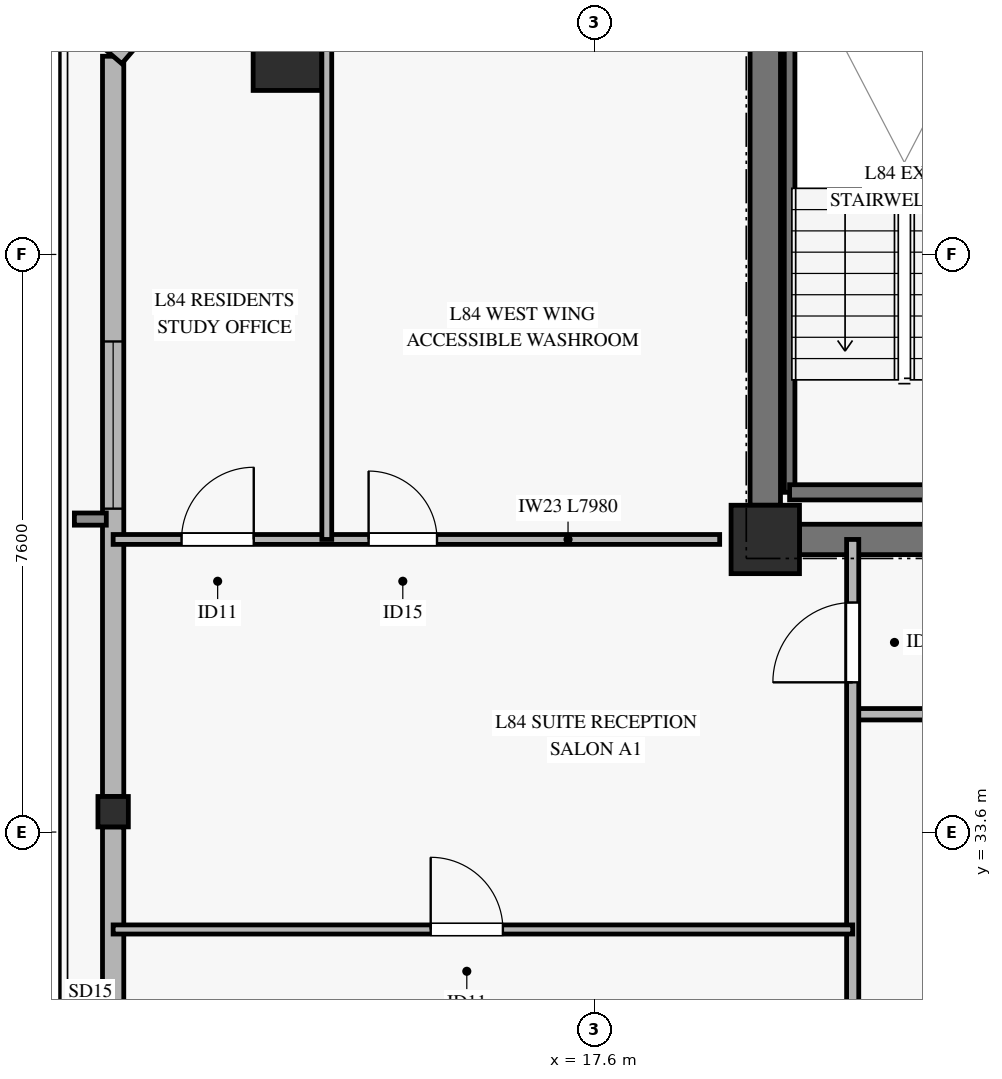
"""IFC4 building model, lengths in metres.
Left out: names, types, materials, properties, quantities, classifications, styles, units other than length and angle.
Written with IfcOpenShell. Run it as: python <this file> out.ifc"""

import sys

from ifc_helpers import new_model, si_unit, direction, frame, frame_2d, origin, origin_2d, place, context, subcontext, project, spatial, rectangle, hollow_rectangle, extrude, source, transform, mapped, element, fill, save


model = new_model("IFC4")
c1 = context("Model", 3, precision=1e-05, world=origin(), true_north=direction((0.0, 1.0)))
c2 = subcontext(c1, "Body", "Model", "MODEL_VIEW")
j1 = project(units=[si_unit("LENGTHUNIT", "METRE"), si_unit("PLANEANGLEUNIT", "RADIAN")], contexts=[c1])
p1 = place(None, origin())
s1 = spatial("IfcSite", under=j1, at=p1, CompositionType="ELEMENT")
p2 = place(p1, origin())
s2 = spatial("IfcBuilding", under=s1, at=p2, CompositionType="ELEMENT")
p3 = place(p2, frame((0.0, 0.0, 324.4)))
s3 = spatial("IfcBuildingStorey", under=s2, at=p3, CompositionType="ELEMENT", Elevation=324.4)
m1 = source(origin(), c2, "Body", "SweptSolid", [
    extrude(rectangle(XDim=0.9, YDim=0.9, at=origin_2d()), origin(), (0.0, 0.0, 1.0), 3.12),
])
p4 = place(p3, frame((19.85, 37.45, 0.0), z_axis=(0.0, 0.0, 1.0), x_axis=(1.0, 0.0, 0.0)))
e1 = element("IfcColumn", 1, at=p4, inside=s3, PredefinedType="PILASTER", context=c2, shape_type="MappedRepresentation", body=[
    mapped(m1, transform((0.0, 0.0, 0.0), x_axis=(1.0, 0.0, 0.0), y_axis=(0.0, 1.0, 0.0), z_axis=(0.0, 0.0, 1.0), scale=1.0)),
])
p5 = place(p3, frame((20.3, 37.45, 0.0), z_axis=(0.0, 0.0, 1.0), x_axis=(1.0, 0.0, 0.0)))
e2 = element("IfcWall", 2, at=p5, inside=s3, PredefinedType="SHEAR", context=c2, shape_type="SweptSolid", body=[
    extrude(rectangle(XDim=10.05, YDim=0.4, at=frame_2d((5.025, 0.0))), origin(), (0.0, 0.0, 1.0), 3.12),
])
p6 = place(p5, frame((4.25, 0.0, 0.0)))
e3 = element("IfcOpeningElement", 3, at=p6, cuts=e2, PredefinedType="OPENING", context=c2, shape_type="SweptSolid", body=[
    extrude(rectangle(XDim=1.2, YDim=2.15, at=frame_2d((0.6, 1.075))), frame((0.0, 0.21, 0.0), z_axis=(0.0, -1.0, 0.0), x_axis=(1.0, 0.0, 0.0)), (0.0, 0.0, 1.0), 0.42),
])
p7 = place(p3, frame((19.85, 37.9, 0.0), z_axis=(0.0, 0.0, 1.0), x_axis=(0.0, 1.0, 0.0)))
e4 = element("IfcWall", 4, at=p7, inside=s3, PredefinedType="SHEAR", context=c2, shape_type="SweptSolid", body=[
    extrude(rectangle(XDim=8.2, YDim=0.4, at=frame_2d((4.1, 0.0))), origin(), (0.0, 0.0, 1.0), 3.12),
])
m2 = source(origin(), c2, "Body", "SweptSolid", [
    extrude(hollow_rectangle(XDim=0.9, YDim=0.9, WallThickness=0.04, at=origin_2d()), origin(), (0.0, 0.0, 1.0), 3.12),
])
p8 = place(p3, frame((13.562, 43.808, 0.0), z_axis=(0.0, 0.0, 1.0), x_axis=(1.0, 0.0, 0.0)))
e5 = element("IfcColumn", 5, at=p8, inside=s3, PredefinedType="COLUMN", context=c2, shape_type="MappedRepresentation", body=[
    mapped(m2, transform((0.0, 0.0, 0.0), x_axis=(1.0, 0.0, 0.0), y_axis=(0.0, 1.0, 0.0), z_axis=(0.0, 0.0, 1.0), scale=1.0)),
])
m3 = source(origin(), c2, "Body", "SweptSolid", [
    extrude(hollow_rectangle(XDim=0.4, YDim=0.4, WallThickness=0.02, at=origin_2d()), origin(), (0.0, 0.0, 1.0), 3.12),
])
p9 = place(p3, frame((11.27, 33.868, 0.0), z_axis=(0.0, 0.0, 1.0), x_axis=(1.0, 0.0, 0.0)))
e6 = element("IfcColumn", 6, at=p9, inside=s3, PredefinedType="COLUMN", context=c2, shape_type="MappedRepresentation", body=[
    mapped(m3, transform((0.0, 0.0, 0.0), x_axis=(1.0, 0.0, 0.0), y_axis=(0.0, 1.0, 0.0), z_axis=(0.0, 0.0, 1.0), scale=1.0)),
])
p10 = place(p3, frame((11.27, 23.928, 0.0), z_axis=(0.0, 0.0, 1.0), x_axis=(0.0, 1.0, 0.0)))
e7 = element("IfcWall", 7, at=p10, inside=s3, PredefinedType="SOLIDWALL", context=c2, shape_type="SweptSolid", body=[
    extrude(rectangle(XDim=9.74, YDim=0.28, at=frame_2d((4.87, 0.0))), origin(), (0.0, 0.0, 1.0), 2.75),
])
p11 = place(p3, frame((11.27, 34.068, 0.0), z_axis=(0.0, 0.0, 1.0), x_axis=(0.0, 1.0, 0.0)))
e8 = element("IfcWall", 8, at=p11, inside=s3, PredefinedType="SOLIDWALL", context=c2, shape_type="SweptSolid", body=[
    extrude(rectangle(XDim=9.74, YDim=0.28, at=frame_2d((4.87, 0.0))), origin(), (0.0, 0.0, 1.0), 2.75),
])
p12 = place(p11, frame((3.787, 0.0, 0.45)))
e9 = element("IfcOpeningElement", 9, at=p12, cuts=e8, PredefinedType="OPENING", context=c2, shape_type="SweptSolid", body=[
    extrude(rectangle(XDim=2.2, YDim=2.1, at=frame_2d((1.1, 1.05))), frame((0.0, 0.15, 0.0), z_axis=(0.0, -1.0, 0.0), x_axis=(1.0, 0.0, 0.0)), (0.0, 0.0, 1.0), 0.3),
])
p13 = place(p3, frame((13.362, 46.25, 0.0), z_axis=(0.0, 0.0, 1.0), x_axis=(-0.650610025707, -0.759412005732, 0.0)))
e10 = element("IfcWall", 10, at=p13, inside=s3, PredefinedType="SOLIDWALL", context=c2, shape_type="SweptSolid", body=[
    extrude(rectangle(XDim=3.216, YDim=0.3, at=frame_2d((1.608, 0.0))), origin(), (0.0, 0.0, 1.0), 2.75),
])
p14 = place(p13, frame((0.808, 0.0, 0.45)))
e11 = element("IfcOpeningElement", 11, at=p14, cuts=e10, PredefinedType="OPENING", context=c2, shape_type="SweptSolid", body=[
    extrude(rectangle(XDim=1.6, YDim=2.0, at=frame_2d((0.8, 1.0))), frame((0.0, 0.16, 0.0), z_axis=(0.0, -1.0, 0.0), x_axis=(1.0, 0.0, 0.0)), (0.0, 0.0, 1.0), 0.32),
])
p15 = place(p3, frame((20.17, 38.07, 0.0), z_axis=(0.0, 0.0, 1.0), x_axis=(0.0, 1.0, 0.0)))
e12 = element("IfcWall", 12, at=p15, inside=s3, PredefinedType="SOLIDWALL", context=c2, shape_type="SweptSolid", body=[
    extrude(rectangle(XDim=7.25, YDim=0.14, at=frame_2d((3.625, 0.0))), origin(), (0.0, 0.0, 1.0), 3.4),
])
p16 = place(p3, frame((20.17, 38.07, 0.0), z_axis=(0.0, 0.0, 1.0), x_axis=(1.0, 0.0, 0.0)))
e13 = element("IfcWall", 13, at=p16, inside=s3, PredefinedType="SOLIDWALL", context=c2, shape_type="SweptSolid", body=[
    extrude(rectangle(XDim=3.05, YDim=0.2, at=frame_2d((1.525, 0.0))), origin(), (0.0, 0.0, 1.0), 3.4),
])
p17 = place(p3, frame((21.0, 35.15, 0.0), z_axis=(0.0, 0.0, 1.0), x_axis=(1.0, 0.0, 0.0)))
e14 = element("IfcWall", 14, at=p17, inside=s3, PredefinedType="PARTITIONING", context=c2, shape_type="SweptSolid", body=[
    extrude(rectangle(XDim=23.2, YDim=0.15, at=frame_2d((11.6, 0.0))), origin(), (0.0, 0.0, 1.0), 2.405),
])
p18 = place(p17, frame((4.577, 0.0, 0.0)))
e15 = element("IfcOpeningElement", 15, at=p18, cuts=e14, PredefinedType="OPENING", context=c2, shape_type="SweptSolid", body=[
    extrude(rectangle(XDim=1.05, YDim=2.15, at=frame_2d((0.525, 1.075))), frame((0.0, 0.085, 0.0), z_axis=(0.0, -1.0, 0.0), x_axis=(1.0, 0.0, 0.0)), (0.0, 0.0, 1.0), 0.17),
])
p19 = place(p17, frame((16.177, 0.0, 0.0)))
e16 = element("IfcOpeningElement", 16, at=p19, cuts=e14, PredefinedType="OPENING", context=c2, shape_type="SweptSolid", body=[
    extrude(rectangle(XDim=1.05, YDim=2.15, at=frame_2d((0.525, 1.075))), frame((0.0, 0.085, 0.0), z_axis=(0.0, -1.0, 0.0), x_axis=(1.0, 0.0, 0.0)), (0.0, 0.0, 1.0), 0.17),
])
p20 = place(p3, frame((21.0, 21.636, 0.0), z_axis=(0.0, 0.0, 1.0), x_axis=(0.0, 1.0, 0.0)))
e17 = element("IfcWall", 17, at=p20, inside=s3, PredefinedType="PARTITIONING", context=c2, shape_type="SweptSolid", body=[
    extrude(rectangle(XDim=15.814, YDim=0.16, at=frame_2d((7.907, 0.0))), origin(), (0.0, 0.0, 1.0), 2.705),
])
p21 = place(p20, frame((13.934, 0.0, 0.0)))
e18 = element("IfcOpeningElement", 18, at=p21, cuts=e17, PredefinedType="OPENING", context=c2, shape_type="SweptSolid", body=[
    extrude(rectangle(XDim=1.05, YDim=2.15, at=frame_2d((0.525, 1.075))), frame((0.0, 0.09, 0.0), z_axis=(0.0, -1.0, 0.0), x_axis=(1.0, 0.0, 0.0)), (0.0, 0.0, 1.0), 0.18),
])
p22 = place(p3, frame((11.27, 32.318, 0.0), z_axis=(0.0, 0.0, 1.0), x_axis=(1.0, 0.0, 0.0)))
e19 = element("IfcWall", 19, at=p22, inside=s3, PredefinedType="PARTITIONING", context=c2, shape_type="SweptSolid", body=[
    extrude(rectangle(XDim=9.73, YDim=0.12, at=frame_2d((4.865, 0.0))), origin(), (0.0, 0.0, 1.0), 2.405),
])
p23 = place(p22, frame((4.178, 0.0, 0.0)))
e20 = element("IfcOpeningElement", 20, at=p23, cuts=e19, PredefinedType="OPENING", context=c2, shape_type="SweptSolid", body=[
    extrude(rectangle(XDim=0.95, YDim=2.1, at=frame_2d((0.475, 1.05))), frame((0.0, 0.07, 0.0), z_axis=(0.0, -1.0, 0.0), x_axis=(1.0, 0.0, 0.0)), (0.0, 0.0, 1.0), 0.14),
])
p24 = place(p3, frame((11.27, 37.45, 0.0), z_axis=(0.0, 0.0, 1.0), x_axis=(1.0, 0.0, 0.0)))
e21 = element("IfcWall", 21, at=p24, inside=s3, PredefinedType="PARTITIONING", context=c2, shape_type="SweptSolid", body=[
    extrude(rectangle(XDim=7.98, YDim=0.13, at=frame_2d((3.99, 0.0))), origin(), (0.0, 0.0, 1.0), 2.755),
])
p25 = place(p24, frame((0.9, 0.0, 0.0)))
e22 = element("IfcOpeningElement", 22, at=p25, cuts=e21, PredefinedType="OPENING", context=c2, shape_type="SweptSolid", body=[
    extrude(rectangle(XDim=0.95, YDim=2.1, at=frame_2d((0.475, 1.05))), frame((0.0, 0.075, 0.0), z_axis=(0.0, -1.0, 0.0), x_axis=(1.0, 0.0, 0.0)), (0.0, 0.0, 1.0), 0.15),
])
p26 = place(p24, frame((3.361, 0.0, 0.0)))
e23 = element("IfcOpeningElement", 23, at=p26, cuts=e21, PredefinedType="OPENING", context=c2, shape_type="SweptSolid", body=[
    extrude(rectangle(XDim=0.9, YDim=2.1, at=frame_2d((0.45, 1.05))), frame((0.0, 0.075, 0.0), z_axis=(0.0, -1.0, 0.0), x_axis=(1.0, 0.0, 0.0)), (0.0, 0.0, 1.0), 0.15),
])
p27 = place(p3, frame((14.081, 37.45, 0.0), z_axis=(0.0, 0.0, 1.0), x_axis=(0.0, 1.0, 0.0)))
e24 = element("IfcWall", 24, at=p27, inside=s3, PredefinedType="PARTITIONING", context=c2, shape_type="SweptSolid", body=[
    extrude(rectangle(XDim=8.8, YDim=0.13, at=frame_2d((4.4, 0.0))), origin(), (0.0, 0.0, 1.0), 3.12),
])
m4 = source(origin(), c2, "Body", "SweptSolid", [
    extrude(rectangle(XDim=2.2, YDim=2.1, at=frame_2d((1.1, 1.05))), frame((0.0, 0.03, 0.0), z_axis=(0.0, -1.0, 0.0), x_axis=(1.0, 0.0, 0.0)), (0.0, 0.0, 1.0), 0.06),
])
p28 = place(p12, origin())
e25 = element("IfcWindow", 25, at=p28, inside=s3, PartitioningType="SINGLE_PANEL", PredefinedType="WINDOW", context=c2, shape_type="MappedRepresentation", body=[
    mapped(m4, transform((0.0, 0.0, 0.0), x_axis=(1.0, 0.0, 0.0), y_axis=(0.0, 1.0, 0.0), z_axis=(0.0, 0.0, 1.0), scale=1.0)),
])
fill(e9, e25)
m5 = source(origin(), c2, "Body", "SweptSolid", [
    extrude(rectangle(XDim=1.05, YDim=2.15, at=frame_2d((0.525, 1.075))), frame((0.0, 0.025, 0.0), z_axis=(0.0, -1.0, 0.0), x_axis=(1.0, 0.0, 0.0)), (0.0, 0.0, 1.0), 0.05),
])
p29 = place(p21, origin())
e26 = element("IfcDoor", 26, at=p29, inside=s3, OperationType="SINGLE_SWING_LEFT", PredefinedType="DOOR", context=c2, shape_type="MappedRepresentation", body=[
    mapped(m5, transform((0.0, 0.0, 0.0), x_axis=(1.0, 0.0, 0.0), y_axis=(0.0, 1.0, 0.0), z_axis=(0.0, 0.0, 1.0), scale=1.0)),
])
fill(e18, e26)
m6 = source(origin(), c2, "Body", "SweptSolid", [
    extrude(rectangle(XDim=0.95, YDim=2.1, at=frame_2d((0.475, 1.05))), frame((0.0, 0.025, 0.0), z_axis=(0.0, -1.0, 0.0), x_axis=(1.0, 0.0, 0.0)), (0.0, 0.0, 1.0), 0.05),
])
p30 = place(p23, origin())
e27 = element("IfcDoor", 27, at=p30, inside=s3, OperationType="SINGLE_SWING_LEFT", PredefinedType="DOOR", context=c2, shape_type="MappedRepresentation", body=[
    mapped(m6, transform((0.0, 0.0, 0.0), x_axis=(1.0, 0.0, 0.0), y_axis=(0.0, 1.0, 0.0), z_axis=(0.0, 0.0, 1.0), scale=1.0)),
])
fill(e20, e27)
p31 = place(p25, origin())
e28 = element("IfcDoor", 28, at=p31, inside=s3, OperationType="SINGLE_SWING_RIGHT", PredefinedType="DOOR", context=c2, shape_type="MappedRepresentation", body=[
    mapped(m6, transform((0.0, 0.0, 0.0), x_axis=(1.0, 0.0, 0.0), y_axis=(0.0, 1.0, 0.0), z_axis=(0.0, 0.0, 1.0), scale=1.0)),
])
fill(e22, e28)
m7 = source(origin(), c2, "Body", "SweptSolid", [
    extrude(rectangle(XDim=0.9, YDim=2.1, at=frame_2d((0.45, 1.05))), frame((0.0, 0.025, 0.0), z_axis=(0.0, -1.0, 0.0), x_axis=(1.0, 0.0, 0.0)), (0.0, 0.0, 1.0), 0.05),
])
p32 = place(p26, origin())
e29 = element("IfcDoor", 29, at=p32, inside=s3, OperationType="SINGLE_SWING_LEFT", PredefinedType="DOOR", context=c2, shape_type="MappedRepresentation", body=[
    mapped(m7, transform((0.0, 0.0, 0.0), x_axis=(1.0, 0.0, 0.0), y_axis=(0.0, 1.0, 0.0), z_axis=(0.0, 0.0, 1.0), scale=1.0)),
])
fill(e23, e29)
save(model, sys.argv[1])
